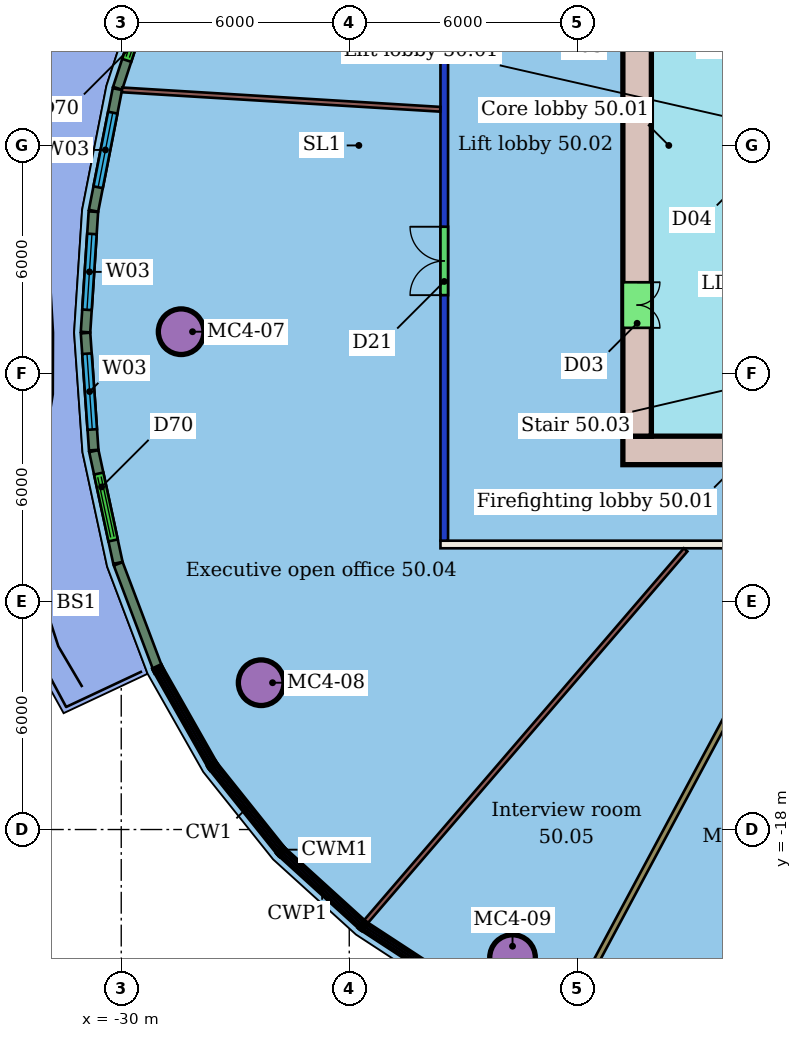
"""IFC4 building model, lengths in metres.
Left out: names, types, materials, properties, quantities, classifications, styles, units other than length and angle.
Written with IfcOpenShell. Run it as: python <this file> out.ifc"""

import sys

from ifc_helpers import new_model, si_unit, direction, frame, frame_2d, origin, origin_2d, place, context, subcontext, project, spatial, rectangle, hollow_circle, extrude, element, fill, save


model = new_model("IFC4")
c1 = context("Model", 3, precision=1e-05, world=origin(), true_north=direction((0.0, 1.0)))
c2 = subcontext(c1, "Body", "Model", "MODEL_VIEW")
j1 = project(units=[si_unit("LENGTHUNIT", "METRE"), si_unit("PLANEANGLEUNIT", "RADIAN")], contexts=[c1])
p1 = place(None, origin())
s1 = spatial("IfcSite", under=j1, at=p1, CompositionType="ELEMENT")
p2 = place(p1, origin())
s2 = spatial("IfcBuilding", under=s1, at=p2, CompositionType="ELEMENT")
p3 = place(p2, frame((0.0, 0.0, 206.5)))
s3 = spatial("IfcBuildingStorey", under=s2, at=p3, CompositionType="ELEMENT", Elevation=206.5)
for number, where, z_axis, x_axis in (
    (1, (-28.424, -4.901, 0.0), (0.0, 0.0, 1.0), (1.0, 0.0, 0.0)),
    (2, (-26.318, -14.137, 0.0), (0.0, 0.0, 1.0), (1.0, 0.0, 0.0)),
    (3, (-19.704, -21.37, 0.0), (0.0, 0.0, 1.0), (1.0, 0.0, 0.0)),
):
    element("IfcColumn", number, at=place(p3, frame(where, z_axis=z_axis, x_axis=x_axis)), inside=s3, PredefinedType="COLUMN", context=c2, shape_type="SweptSolid", body=[
        extrude(hollow_circle(Radius=0.6, WallThickness=0.045, at=origin_2d()), origin(), (0.0, 0.0, 1.0), 3.45),
    ])
p4 = place(p3, frame((9.6, -10.5, 0.0), z_axis=(0.0, 0.0, 1.0), x_axis=(-1.0, 0.0, 0.0)))
e4 = element("IfcWall", 4, at=p4, inside=s3, PredefinedType="PARTITIONING", context=c2, shape_type="SweptSolid", body=[
    extrude(rectangle(XDim=31.2, YDim=0.2, at=frame_2d((15.6, 0.0))), origin(), (0.0, 0.0, 1.0), 3.45),
])
p5 = place(p4, frame((22.21, 0.0, 0.0)))
e5 = element("IfcOpeningElement", 5, at=p5, cuts=e4, PredefinedType="OPENING", context=c2, shape_type="SweptSolid", body=[
    extrude(rectangle(XDim=0.9, YDim=2.1, at=frame_2d((0.45, 1.05))), frame((0.0, 0.11, 0.0), z_axis=(0.0, -1.0, 0.0), x_axis=(1.0, 0.0, 0.0)), (0.0, 0.0, 1.0), 0.22),
])
p6 = place(p4, frame((19.173, 0.0, 0.0)))
e6 = element("IfcOpeningElement", 6, at=p6, cuts=e4, PredefinedType="OPENING", context=c2, shape_type="SweptSolid", body=[
    extrude(rectangle(XDim=0.9, YDim=2.1, at=frame_2d((0.45, 1.05))), frame((0.0, 0.11, 0.0), z_axis=(0.0, -1.0, 0.0), x_axis=(1.0, 0.0, 0.0)), (0.0, 0.0, 1.0), 0.22),
])
p7 = place(p4, frame((8.72, 0.0, 0.0)))
e7 = element("IfcOpeningElement", 7, at=p7, cuts=e4, PredefinedType="OPENING", context=c2, shape_type="SweptSolid", body=[
    extrude(rectangle(XDim=1.8, YDim=2.4, at=frame_2d((0.9, 1.2))), frame((0.0, 0.11, 0.0), z_axis=(0.0, -1.0, 0.0), x_axis=(1.0, 0.0, 0.0)), (0.0, 0.0, 1.0), 0.22),
])
p8 = place(p4, frame((3.052, 0.0, 0.0)))
e8 = element("IfcOpeningElement", 8, at=p8, cuts=e4, PredefinedType="OPENING", context=c2, shape_type="SweptSolid", body=[
    extrude(rectangle(XDim=1.0, YDim=2.4, at=frame_2d((0.5, 1.2))), frame((0.0, 0.11, 0.0), z_axis=(0.0, -1.0, 0.0), x_axis=(1.0, 0.0, 0.0)), (0.0, 0.0, 1.0), 0.22),
])
p9 = place(p3, frame((-21.5, -10.4, 0.0), z_axis=(0.0, 0.0, 1.0), x_axis=(0.0, 1.0, 0.0)))
e9 = element("IfcWall", 9, at=p9, inside=s3, PredefinedType="PARTITIONING", context=c2, shape_type="SweptSolid", body=[
    extrude(rectangle(XDim=20.8, YDim=0.2, at=frame_2d((10.4, 0.0))), origin(), (0.0, 0.0, 1.0), 3.05),
])
p10 = place(p9, frame((6.461, 0.0, 0.0)))
e10 = element("IfcOpeningElement", 10, at=p10, cuts=e9, PredefinedType="OPENING", context=c2, shape_type="SweptSolid", body=[
    extrude(rectangle(XDim=1.8, YDim=2.1, at=frame_2d((0.9, 1.05))), frame((0.0, 0.11, 0.0), z_axis=(0.0, -1.0, 0.0), x_axis=(1.0, 0.0, 0.0)), (0.0, 0.0, 1.0), 0.22),
])
p11 = place(p3, frame((-29.979, 1.462, 0.0), z_axis=(0.0, 0.0, 1.0), x_axis=(0.998147297747, -0.060843832889, 0.0)))
e11 = element("IfcWall", 11, at=p11, inside=s3, PredefinedType="PARTITIONING", context=c2, shape_type="SweptSolid", body=[
    extrude(rectangle(XDim=8.39, YDim=0.125, at=frame_2d((4.195, 0.0))), origin(), (0.0, 0.0, 1.0), 3.45),
])
p12 = place(p3, frame((-23.564, -20.427, 0.0), z_axis=(0.0, 0.0, 1.0), x_axis=(0.651952710233, 0.758259628109, 0.0)))
e12 = element("IfcWall", 12, at=p12, inside=s3, PredefinedType="PARTITIONING", context=c2, shape_type="SweptSolid", body=[
    extrude(rectangle(XDim=12.907, YDim=0.125, at=frame_2d((6.453, 0.0))), origin(), (0.0, 0.0, 1.0), 3.45),
])
p13 = place(p3, frame((-18.445, -23.228, 0.0), z_axis=(0.0, 0.0, 1.0), x_axis=(0.472259350385, 0.881459645119, 0.0)))
e13 = element("IfcWall", 13, at=p13, inside=s3, PredefinedType="PARTITIONING", context=c2, shape_type="SweptSolid", body=[
    extrude(rectangle(XDim=14.286, YDim=0.15, at=frame_2d((7.143, 0.0))), origin(), (0.0, 0.0, 1.0), 3.45),
])
p14 = place(p3, frame((-29.057, 4.683, 0.0), z_axis=(0.0, 0.0, 1.0), x_axis=(-0.310658941467, -0.950521447463, 0.0)))
e14 = element("IfcWall", 14, at=p14, inside=s3, PredefinedType="SOLIDWALL", context=c2, shape_type="SweptSolid", body=[
    extrude(rectangle(XDim=3.344, YDim=0.25, at=frame_2d((1.672, 0.0))), origin(), (0.0, 0.0, 1.0), 3.1),
])
p15 = place(p14, frame((0.772, 0.0, 0.0)))
e15 = element("IfcOpeningElement", 15, at=p15, cuts=e14, PredefinedType="OPENING", context=c2, shape_type="SweptSolid", body=[
    extrude(rectangle(XDim=1.8, YDim=2.4, at=frame_2d((0.9, 1.2))), frame((0.0, 0.135, 0.0), z_axis=(0.0, -1.0, 0.0), x_axis=(1.0, 0.0, 0.0)), (0.0, 0.0, 1.0), 0.27),
])
p16 = place(p3, frame((-30.102, 1.482, 0.0), z_axis=(0.0, 0.0, 1.0), x_axis=(-0.192487942272, -0.981299338673, 0.0)))
e16 = element("IfcWall", 16, at=p16, inside=s3, PredefinedType="SOLIDWALL", context=c2, shape_type="SweptSolid", body=[
    extrude(rectangle(XDim=3.262, YDim=0.25, at=frame_2d((1.631, 0.0))), origin(), (0.0, 0.0, 1.0), 3.1),
])
p17 = place(p16, frame((0.631, 0.0, 0.9)))
e17 = element("IfcOpeningElement", 17, at=p17, cuts=e16, PredefinedType="OPENING", context=c2, shape_type="SweptSolid", body=[
    extrude(rectangle(XDim=2.0, YDim=2.1, at=frame_2d((1.0, 1.05))), frame((0.0, 0.135, 0.0), z_axis=(0.0, -1.0, 0.0), x_axis=(1.0, 0.0, 0.0)), (0.0, 0.0, 1.0), 0.27),
])
p18 = place(p3, frame((-30.733, -1.743, 0.0), z_axis=(0.0, 0.0, 1.0), x_axis=(-0.065278866851, -0.997867060055, 0.0)))
e18 = element("IfcWall", 18, at=p18, inside=s3, PredefinedType="SOLIDWALL", context=c2, shape_type="SweptSolid", body=[
    extrude(rectangle(XDim=3.175, YDim=0.25, at=frame_2d((1.588, 0.0))), origin(), (0.0, 0.0, 1.0), 3.1),
])
p19 = place(p18, frame((0.588, 0.0, 0.9)))
e19 = element("IfcOpeningElement", 19, at=p19, cuts=e18, PredefinedType="OPENING", context=c2, shape_type="SweptSolid", body=[
    extrude(rectangle(XDim=2.0, YDim=2.1, at=frame_2d((1.0, 1.05))), frame((0.0, 0.135, 0.0), z_axis=(0.0, -1.0, 0.0), x_axis=(1.0, 0.0, 0.0)), (0.0, 0.0, 1.0), 0.27),
])
p20 = place(p3, frame((-30.94, -4.936, 0.0), z_axis=(0.0, 0.0, 1.0), x_axis=(0.06987632373, -0.997555662298, 0.0)))
e20 = element("IfcWall", 20, at=p20, inside=s3, PredefinedType="SOLIDWALL", context=c2, shape_type="SweptSolid", body=[
    extrude(rectangle(XDim=3.089, YDim=0.25, at=frame_2d((1.544, 0.0))), origin(), (0.0, 0.0, 1.0), 3.1),
])
p21 = place(p20, frame((0.544, 0.0, 0.9)))
e21 = element("IfcOpeningElement", 21, at=p21, cuts=e20, PredefinedType="OPENING", context=c2, shape_type="SweptSolid", body=[
    extrude(rectangle(XDim=2.0, YDim=2.1, at=frame_2d((1.0, 1.05))), frame((0.0, 0.135, 0.0), z_axis=(0.0, -1.0, 0.0), x_axis=(1.0, 0.0, 0.0)), (0.0, 0.0, 1.0), 0.27),
])
p22 = place(p3, frame((-30.72, -8.043, 0.0), z_axis=(0.0, 0.0, 1.0), x_axis=(0.210637196003, -0.977564305639, 0.0)))
e22 = element("IfcWall", 22, at=p22, inside=s3, PredefinedType="SOLIDWALL", context=c2, shape_type="SweptSolid", body=[
    extrude(rectangle(XDim=3.009, YDim=0.25, at=frame_2d((1.504, 0.0))), origin(), (0.0, 0.0, 1.0), 3.1),
])
p23 = place(p22, frame((0.604, 0.0, 0.0)))
e23 = element("IfcOpeningElement", 23, at=p23, cuts=e22, PredefinedType="OPENING", context=c2, shape_type="SweptSolid", body=[
    extrude(rectangle(XDim=1.8, YDim=2.4, at=frame_2d((0.9, 1.2))), frame((0.0, 0.135, 0.0), z_axis=(0.0, -1.0, 0.0), x_axis=(1.0, 0.0, 0.0)), (0.0, 0.0, 1.0), 0.27),
])
p24 = place(p3, frame((-30.079, -11.01, 0.0), z_axis=(0.0, 0.0, 1.0), x_axis=(0.353400568719, -0.935472093667, 0.0)))
e24 = element("IfcWall", 24, at=p24, inside=s3, PredefinedType="SOLIDWALL", context=c2, shape_type="SweptSolid", body=[
    extrude(rectangle(XDim=2.901, YDim=0.25, at=frame_2d((1.45, 0.0))), origin(), (0.0, 0.0, 1.0), 3.1),
])
p25 = place(p3, frame((-16.8, -8.025, 0.0), z_axis=(0.0, 0.0, 1.0), x_axis=(1.0, 0.0, 0.0)))
e25 = element("IfcWall", 25, at=p25, inside=s3, PredefinedType="SHEAR", context=c2, shape_type="SweptSolid", body=[
    extrude(rectangle(XDim=21.6, YDim=0.75, at=frame_2d((10.8, 0.0))), origin(), (0.0, 0.0, 1.0), 3.3),
])
p26 = place(p25, frame((4.8, 0.0, 0.0)))
e26 = element("IfcOpeningElement", 26, at=p26, cuts=e25, PredefinedType="OPENING", context=c2, shape_type="SweptSolid", body=[
    extrude(rectangle(XDim=1.2, YDim=2.1, at=frame_2d((0.6, 1.05))), frame((0.0, 0.385, 0.0), z_axis=(0.0, -1.0, 0.0), x_axis=(1.0, 0.0, 0.0)), (0.0, 0.0, 1.0), 0.77),
])
p27 = place(p3, frame((-16.425, 7.65, 0.0), z_axis=(0.0, 0.0, 1.0), x_axis=(0.0, -1.0, 0.0)))
e27 = element("IfcWall", 27, at=p27, inside=s3, PredefinedType="SHEAR", context=c2, shape_type="SweptSolid", body=[
    extrude(rectangle(XDim=15.3, YDim=0.75, at=frame_2d((7.65, 0.0))), origin(), (0.0, 0.0, 1.0), 3.3),
])
p28 = place(p27, frame((11.25, 0.0, 0.0)))
e28 = element("IfcOpeningElement", 28, at=p28, cuts=e27, PredefinedType="OPENING", context=c2, shape_type="SweptSolid", body=[
    extrude(rectangle(XDim=1.2, YDim=2.1, at=frame_2d((0.6, 1.05))), frame((0.0, 0.385, 0.0), z_axis=(0.0, -1.0, 0.0), x_axis=(1.0, 0.0, 0.0)), (0.0, 0.0, 1.0), 0.77),
])
p29 = place(p27, frame((2.85, 0.0, 0.0)))
e29 = element("IfcOpeningElement", 29, at=p29, cuts=e27, PredefinedType="OPENING", context=c2, shape_type="SweptSolid", body=[
    extrude(rectangle(XDim=1.2, YDim=2.1, at=frame_2d((0.6, 1.05))), frame((0.0, 0.385, 0.0), z_axis=(0.0, -1.0, 0.0), x_axis=(1.0, 0.0, 0.0)), (0.0, 0.0, 1.0), 0.77),
])
p30 = place(p10, origin())
e30 = element("IfcDoor", 30, at=p30, inside=s3, OperationType="DOUBLE_DOOR_SINGLE_SWING", PredefinedType="DOOR", context=c2, shape_type="SweptSolid", body=[
    extrude(rectangle(XDim=1.8, YDim=2.1, at=frame_2d((0.9, 1.05))), frame((0.0, 0.025, 0.0), z_axis=(0.0, -1.0, 0.0), x_axis=(1.0, 0.0, 0.0)), (0.0, 0.0, 1.0), 0.05),
])
fill(e10, e30)
p31 = place(p15, origin())
e31 = element("IfcDoor", 31, at=p31, inside=s3, OperationType="DOUBLE_DOOR_SLIDING", PredefinedType="DOOR", context=c2, shape_type="SweptSolid", body=[
    extrude(rectangle(XDim=1.8, YDim=2.4, at=frame_2d((0.9, 1.2))), frame((0.0, 0.025, 0.0), z_axis=(0.0, -1.0, 0.0), x_axis=(1.0, 0.0, 0.0)), (0.0, 0.0, 1.0), 0.05),
])
fill(e15, e31)
p32 = place(p17, origin())
e32 = element("IfcWindow", 32, at=p32, inside=s3, PartitioningType="SINGLE_PANEL", PredefinedType="WINDOW", context=c2, shape_type="SweptSolid", body=[
    extrude(rectangle(XDim=2.0, YDim=2.1, at=frame_2d((1.0, 1.05))), frame((0.0, 0.03, 0.0), z_axis=(0.0, -1.0, 0.0), x_axis=(1.0, 0.0, 0.0)), (0.0, 0.0, 1.0), 0.06),
])
fill(e17, e32)
p33 = place(p19, origin())
e33 = element("IfcWindow", 33, at=p33, inside=s3, PartitioningType="SINGLE_PANEL", PredefinedType="WINDOW", context=c2, shape_type="SweptSolid", body=[
    extrude(rectangle(XDim=2.0, YDim=2.1, at=frame_2d((1.0, 1.05))), frame((0.0, 0.03, 0.0), z_axis=(0.0, -1.0, 0.0), x_axis=(1.0, 0.0, 0.0)), (0.0, 0.0, 1.0), 0.06),
])
fill(e19, e33)
p34 = place(p21, origin())
e34 = element("IfcWindow", 34, at=p34, inside=s3, PartitioningType="SINGLE_PANEL", PredefinedType="WINDOW", context=c2, shape_type="SweptSolid", body=[
    extrude(rectangle(XDim=2.0, YDim=2.1, at=frame_2d((1.0, 1.05))), frame((0.0, 0.03, 0.0), z_axis=(0.0, -1.0, 0.0), x_axis=(1.0, 0.0, 0.0)), (0.0, 0.0, 1.0), 0.06),
])
fill(e21, e34)
p35 = place(p23, origin())
e35 = element("IfcDoor", 35, at=p35, inside=s3, OperationType="DOUBLE_DOOR_SLIDING", PredefinedType="DOOR", context=c2, shape_type="SweptSolid", body=[
    extrude(rectangle(XDim=1.8, YDim=2.4, at=frame_2d((0.9, 1.2))), frame((0.0, 0.025, 0.0), z_axis=(0.0, -1.0, 0.0), x_axis=(1.0, 0.0, 0.0)), (0.0, 0.0, 1.0), 0.05),
])
fill(e23, e35)
p36 = place(p28, origin())
e36 = element("IfcDoor", 36, at=p36, inside=s3, OperationType="DOUBLE_DOOR_SINGLE_SWING", PredefinedType="NOTDEFINED", context=c2, shape_type="SweptSolid", body=[
    extrude(rectangle(XDim=1.2, YDim=2.1, at=frame_2d((0.6, 1.05))), frame((0.0, 0.025, 0.0), z_axis=(0.0, -1.0, 0.0), x_axis=(1.0, 0.0, 0.0)), (0.0, 0.0, 1.0), 0.05),
])
fill(e28, e36)
save(model, sys.argv[1])
